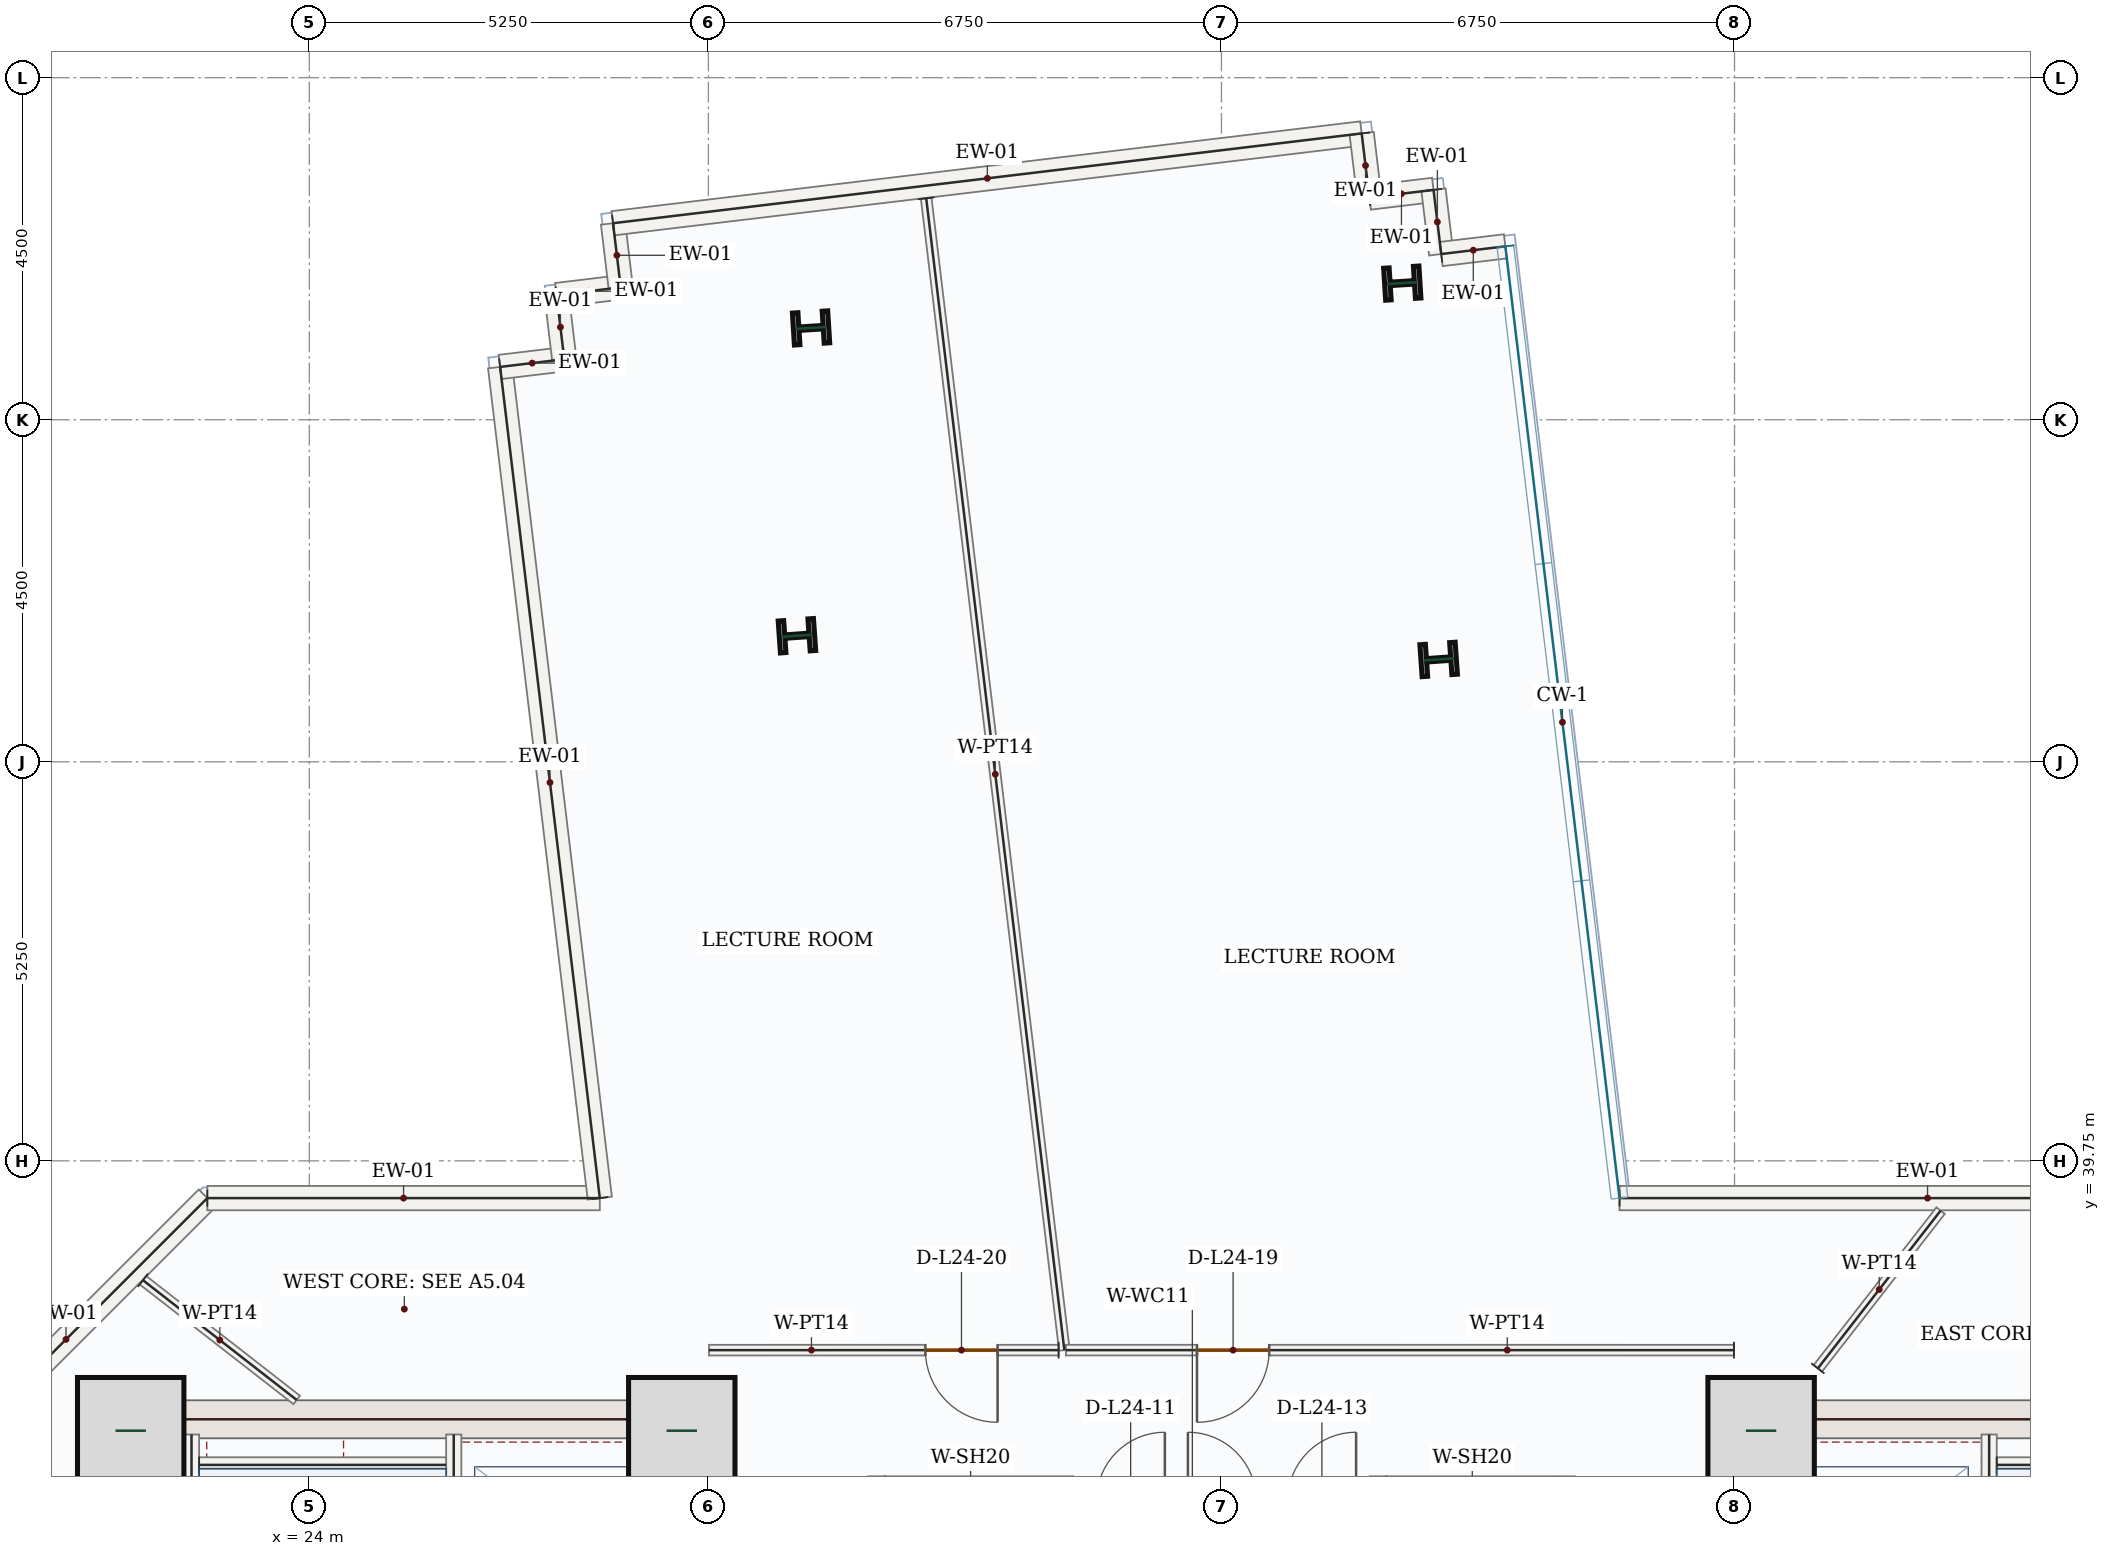
"""IFC4 building model, lengths in metres.
Left out: names, types, materials, properties, quantities, classifications, styles, units other than length and angle.
Written with IfcOpenShell. Run it as: python <this file> out.ifc"""

import sys

from ifc_helpers import new_model, si_unit, direction, frame, frame_2d, origin, origin_2d, place, context, subcontext, project, spatial, rectangle, i_section, extrude, source, transform, mapped, element, fill, save


model = new_model("IFC4")
c1 = context("Model", 3, precision=1e-05, world=origin(), true_north=direction((0.0, 1.0)))
c2 = subcontext(c1, "Body", "Model", "MODEL_VIEW")
j1 = project(units=[si_unit("LENGTHUNIT", "METRE"), si_unit("PLANEANGLEUNIT", "RADIAN")], contexts=[c1])
p1 = place(None, origin())
s1 = spatial("IfcSite", under=j1, at=p1, CompositionType="ELEMENT")
p2 = place(p1, origin())
s2 = spatial("IfcBuilding", under=s1, at=p2, CompositionType="ELEMENT")
p3 = place(p2, frame((0.0, 0.0, 108.9)))
s3 = spatial("IfcBuildingStorey", under=s2, at=p3, CompositionType="ELEMENT", Elevation=108.9)
m1 = source(origin(), c2, "Body", "SweptSolid", [
    extrude(rectangle(XDim=8.55, YDim=0.5, at=frame_2d((4.275, 0.0))), origin(), (0.0, 0.0, 1.0), 3.95),
])
p4 = place(p3, frame((21.5, 28.05, 0.0), z_axis=(0.0, 0.0, 1.0), x_axis=(0.0, 1.0, 0.0)))
e1 = element("IfcWall", 1, at=p4, inside=s3, PredefinedType="SHEAR", context=c2, shape_type="MappedRepresentation", body=[
    mapped(m1, transform((0.0, 0.0, 0.0), x_axis=(1.0, 0.0, 0.0), y_axis=(0.0, 1.0, 0.0), z_axis=(0.0, 0.0, 1.0), scale=1.0)),
])
p5 = place(p3, frame((29.0, 28.05, 0.0), z_axis=(0.0, 0.0, 1.0), x_axis=(0.0, 1.0, 0.0)))
e2 = element("IfcWall", 2, at=p5, inside=s3, PredefinedType="SHEAR", context=c2, shape_type="SweptSolid", body=[
    extrude(rectangle(XDim=8.55, YDim=0.5, at=frame_2d((4.275, 0.0))), origin(), (0.0, 0.0, 1.0), 3.95),
])
p6 = place(p5, frame((1.5, 0.0, 0.0)))
e3 = element("IfcOpeningElement", 3, at=p6, cuts=e2, PredefinedType="OPENING", context=c2, shape_type="SweptSolid", body=[
    extrude(rectangle(XDim=1.1, YDim=2.2, at=frame_2d((0.55, 1.1))), frame((0.0, 0.26, 0.0), z_axis=(0.0, -1.0, 0.0), x_axis=(1.0, 0.0, 0.0)), (0.0, 0.0, 1.0), 0.52),
])
m2 = source(origin(), c2, "Body", "SweptSolid", [
    extrude(rectangle(XDim=7.0, YDim=0.5, at=frame_2d((3.5, 0.0))), origin(), (0.0, 0.0, 1.0), 3.95),
])
p7 = place(p3, frame((21.75, 36.35, 0.0), z_axis=(0.0, 0.0, 1.0), x_axis=(1.0, 0.0, 0.0)))
e4 = element("IfcWall", 4, at=p7, inside=s3, PredefinedType="SHEAR", context=c2, shape_type="MappedRepresentation", body=[
    mapped(m2, transform((0.0, 0.0, 0.0), x_axis=(1.0, 0.0, 0.0), y_axis=(0.0, 1.0, 0.0), z_axis=(0.0, 0.0, 1.0), scale=1.0)),
])
p8 = place(p3, frame((43.0, 28.05, 0.0), z_axis=(0.0, 0.0, 1.0), x_axis=(0.0, 1.0, 0.0)))
e5 = element("IfcWall", 5, at=p8, inside=s3, PredefinedType="SHEAR", context=c2, shape_type="SweptSolid", body=[
    extrude(rectangle(XDim=8.55, YDim=0.5, at=frame_2d((4.275, 0.0))), origin(), (0.0, 0.0, 1.0), 3.95),
])
p9 = place(p8, frame((1.5, 0.0, 0.0)))
e6 = element("IfcOpeningElement", 6, at=p9, cuts=e5, PredefinedType="OPENING", context=c2, shape_type="SweptSolid", body=[
    extrude(rectangle(XDim=1.1, YDim=2.2, at=frame_2d((0.55, 1.1))), frame((0.0, 0.26, 0.0), z_axis=(0.0, -1.0, 0.0), x_axis=(1.0, 0.0, 0.0)), (0.0, 0.0, 1.0), 0.52),
])
p10 = place(p3, frame((43.25, 36.35, 0.0), z_axis=(0.0, 0.0, 1.0), x_axis=(1.0, 0.0, 0.0)))
e7 = element("IfcWall", 7, at=p10, inside=s3, PredefinedType="SHEAR", context=c2, shape_type="MappedRepresentation", body=[
    mapped(m2, transform((0.0, 0.0, 0.0), x_axis=(1.0, 0.0, 0.0), y_axis=(0.0, 1.0, 0.0), z_axis=(0.0, 0.0, 1.0), scale=1.0)),
])
m3 = source(origin(), c2, "Body", "SweptSolid", [
    extrude(rectangle(XDim=1.4, YDim=1.4, at=origin_2d()), origin(), (0.0, 0.0, 1.0), 4.2),
])
for number, where, z_axis, x_axis in (
    (8, (21.65, 36.2, 0.0), (0.0, 0.0, 1.0), (1.0, 0.0, 0.0)),
    (9, (28.9, 36.2, 0.0), (0.0, 0.0, 1.0), (1.0, 0.0, 0.0)),
    (10, (43.1, 36.2, 0.0), (0.0, 0.0, 1.0), (1.0, 0.0, 0.0)),
):
    element("IfcColumn", number, at=place(p3, frame(where, z_axis=z_axis, x_axis=x_axis)), inside=s3, PredefinedType="COLUMN", context=c2, shape_type="MappedRepresentation", body=[
        mapped(m3, transform((0.0, 0.0, 0.0), x_axis=(1.0, 0.0, 0.0), y_axis=(0.0, 1.0, 0.0), z_axis=(0.0, 0.0, 1.0), scale=1.0)),
    ])
m4 = source(origin(), c2, "Body", "SweptSolid", [
    extrude(i_section(OverallWidth=0.421, OverallDepth=0.465, WebThickness=0.045, FlangeThickness=0.073, FilletRadius=0.018, at=origin_2d()), origin(), (0.0, 0.0, 1.0), 4.2),
])
for number, where, z_axis, x_axis in (
    (11, (38.857, 46.346, 0.0), (0.0, 0.0, 1.0), (-0.07, 0.998, 0.0)),
    (12, (30.415, 46.658, 0.0), (0.0, 0.0, 1.0), (-0.07, 0.998, 0.0)),
    (13, (38.379, 51.297, 0.0), (0.0, 0.0, 1.0), (-0.063, 0.998, 0.0)),
    (14, (30.601, 50.708, 0.0), (0.0, 0.0, 1.0), (-0.063, 0.998, 0.0)),
):
    element("IfcColumn", number, at=place(p3, frame(where, z_axis=z_axis, x_axis=x_axis)), inside=s3, PredefinedType="COLUMN", context=c2, shape_type="MappedRepresentation", body=[
        mapped(m4, transform((0.0, 0.0, 0.0), x_axis=(1.0, 0.0, 0.0), y_axis=(0.0, 1.0, 0.0), z_axis=(0.0, 0.0, 1.0), scale=1.0)),
    ])
m5 = source(origin(), c2, "Body", "SweptSolid", [
    extrude(rectangle(XDim=5.258, YDim=0.32, at=frame_2d((2.629, 0.0))), origin(), (0.0, 0.0, 1.0), 3.95),
])
p11 = place(p3, frame((18.94, 35.542, 0.0), z_axis=(0.0, 0.0, 1.0), x_axis=(0.707106781187, 0.707106781187, 0.0)))
e15 = element("IfcWall", 15, at=p11, inside=s3, PredefinedType="SOLIDWALL", context=c2, shape_type="MappedRepresentation", body=[
    mapped(m5, transform((0.0, 0.0, 0.0), x_axis=(1.0, 0.0, 0.0), y_axis=(0.0, 1.0, 0.0), z_axis=(0.0, 0.0, 1.0), scale=1.0)),
])
m6 = source(origin(), c2, "Body", "SweptSolid", [
    extrude(rectangle(XDim=5.164, YDim=0.32, at=frame_2d((2.582, 0.0))), origin(), (0.0, 0.0, 1.0), 3.95),
])
p12 = place(p3, frame((22.658, 39.26, 0.0), z_axis=(0.0, 0.0, 1.0), x_axis=(1.0, 0.0, 0.0)))
e16 = element("IfcWall", 16, at=p12, inside=s3, PredefinedType="SOLIDWALL", context=c2, shape_type="MappedRepresentation", body=[
    mapped(m6, transform((0.0, 0.0, 0.0), x_axis=(1.0, 0.0, 0.0), y_axis=(0.0, 1.0, 0.0), z_axis=(0.0, 0.0, 1.0), scale=1.0)),
])
m7 = source(origin(), c2, "Body", "SweptSolid", [
    extrude(rectangle(XDim=11.013, YDim=0.32, at=frame_2d((5.507, 0.0))), origin(), (0.0, 0.0, 1.0), 3.95),
])
p13 = place(p3, frame((27.822, 39.26, 0.0), z_axis=(0.0, 0.0, 1.0), x_axis=(-0.119086653457, 0.992883864794, 0.0)))
e17 = element("IfcWall", 17, at=p13, inside=s3, PredefinedType="SOLIDWALL", context=c2, shape_type="MappedRepresentation", body=[
    mapped(m7, transform((0.0, 0.0, 0.0), x_axis=(1.0, 0.0, 0.0), y_axis=(0.0, 1.0, 0.0), z_axis=(0.0, 0.0, 1.0), scale=1.0)),
])
m8 = source(origin(), c2, "Body", "SweptSolid", [
    extrude(rectangle(XDim=0.85, YDim=0.32, at=frame_2d((0.425, 0.0))), origin(), (0.0, 0.0, 1.0), 3.95),
])
for number, where, z_axis, x_axis in (
    (18, (26.51, 50.195, 0.0), (0.0, 0.0, 1.0), (0.993, 0.119, 0.0)),
    (19, (27.354, 50.296, 0.0), (0.0, 0.0, 1.0), (-0.119, 0.993, 0.0)),
    (20, (27.253, 51.14, 0.0), (0.0, 0.0, 1.0), (0.993, 0.119, 0.0)),
    (21, (28.097, 51.241, 0.0), (0.0, 0.0, 1.0), (-0.119, 0.993, 0.0)),
):
    element("IfcWall", number, at=place(p3, frame(where, z_axis=z_axis, x_axis=x_axis)), inside=s3, PredefinedType="SOLIDWALL", context=c2, shape_type="MappedRepresentation", body=[
        mapped(m8, transform((0.0, 0.0, 0.0), x_axis=(1.0, 0.0, 0.0), y_axis=(0.0, 1.0, 0.0), z_axis=(0.0, 0.0, 1.0), scale=1.0)),
    ])
m9 = source(origin(), c2, "Body", "SweptSolid", [
    extrude(rectangle(XDim=9.92, YDim=0.32, at=frame_2d((4.96, 0.0))), origin(), (0.0, 0.0, 1.0), 3.95),
])
p14 = place(p3, frame((27.996, 52.085, 0.0), z_axis=(0.0, 0.0, 1.0), x_axis=(0.992883125729, 0.119092815244, 0.0)))
e22 = element("IfcWall", 22, at=p14, inside=s3, PredefinedType="SOLIDWALL", context=c2, shape_type="MappedRepresentation", body=[
    mapped(m9, transform((0.0, 0.0, 0.0), x_axis=(1.0, 0.0, 0.0), y_axis=(0.0, 1.0, 0.0), z_axis=(0.0, 0.0, 1.0), scale=1.0)),
])
for number, where, z_axis, x_axis in (
    (23, (37.845, 53.267, 0.0), (0.0, 0.0, 1.0), (0.119, -0.993, 0.0)),
    (24, (37.946, 52.423, 0.0), (0.0, 0.0, 1.0), (0.993, 0.119, 0.0)),
    (25, (38.79, 52.524, 0.0), (0.0, 0.0, 1.0), (0.119, -0.993, 0.0)),
):
    element("IfcWall", number, at=place(p3, frame(where, z_axis=z_axis, x_axis=x_axis)), inside=s3, PredefinedType="SOLIDWALL", context=c2, shape_type="MappedRepresentation", body=[
        mapped(m8, transform((0.0, 0.0, 0.0), x_axis=(1.0, 0.0, 0.0), y_axis=(0.0, 1.0, 0.0), z_axis=(0.0, 0.0, 1.0), scale=1.0)),
    ])
m10 = source(origin(), c2, "Body", "SweptSolid", [
    extrude(rectangle(XDim=0.85, YDim=0.32, at=frame_2d((0.425, 0.0))), origin(), (0.0, 0.0, 1.0), 3.95),
])
p15 = place(p3, frame((38.891, 51.68, 0.0), z_axis=(0.0, 0.0, 1.0), x_axis=(0.992867319472, 0.119224518976, 0.0)))
e26 = element("IfcWall", 26, at=p15, inside=s3, PredefinedType="SOLIDWALL", context=c2, shape_type="MappedRepresentation", body=[
    mapped(m10, transform((0.0, 0.0, 0.0), x_axis=(1.0, 0.0, 0.0), y_axis=(0.0, 1.0, 0.0), z_axis=(0.0, 0.0, 1.0), scale=1.0)),
])
m11 = source(origin(), c2, "Body", "SweptSolid", [
    extrude(rectangle(XDim=8.105, YDim=0.32, at=frame_2d((4.052, 0.0))), origin(), (0.0, 0.0, 1.0), 3.95),
])
p16 = place(p3, frame((41.237, 39.26, 0.0), z_axis=(0.0, 0.0, 1.0), x_axis=(1.0, 0.0, 0.0)))
e27 = element("IfcWall", 27, at=p16, inside=s3, PredefinedType="SOLIDWALL", context=c2, shape_type="MappedRepresentation", body=[
    mapped(m11, transform((0.0, 0.0, 0.0), x_axis=(1.0, 0.0, 0.0), y_axis=(0.0, 1.0, 0.0), z_axis=(0.0, 0.0, 1.0), scale=1.0)),
])
m12 = source(origin(), c2, "Body", "SweptSolid", [
    extrude(rectangle(XDim=7.87, YDim=0.2, at=frame_2d((3.935, 0.0))), origin(), (0.0, 0.0, 1.0), 3.95),
])
p17 = place(p3, frame((22.45, 28.28, 0.0), z_axis=(0.0, 0.0, 1.0), x_axis=(0.0, 1.0, 0.0)))
e28 = element("IfcWall", 28, at=p17, inside=s3, PredefinedType="SOLIDWALL", context=c2, shape_type="MappedRepresentation", body=[
    mapped(m12, transform((0.0, 0.0, 0.0), x_axis=(1.0, 0.0, 0.0), y_axis=(0.0, 1.0, 0.0), z_axis=(0.0, 0.0, 1.0), scale=1.0)),
])
p18 = place(p3, frame((25.9, 28.15, 0.0), z_axis=(0.0, 0.0, 1.0), x_axis=(0.0, 1.0, 0.0)))
e29 = element("IfcWall", 29, at=p18, inside=s3, PredefinedType="SOLIDWALL", context=c2, shape_type="SweptSolid", body=[
    extrude(rectangle(XDim=8.0, YDim=0.2, at=frame_2d((4.0, 0.0))), origin(), (0.0, 0.0, 1.0), 3.95),
])
p19 = place(p18, frame((0.4, 0.0, 0.0)))
e30 = element("IfcOpeningElement", 30, at=p19, cuts=e29, PredefinedType="OPENING", context=c2, shape_type="SweptSolid", body=[
    extrude(rectangle(XDim=1.05, YDim=2.15, at=frame_2d((0.525, 1.075))), frame((0.0, 0.11, 0.0), z_axis=(0.0, -1.0, 0.0), x_axis=(1.0, 0.0, 0.0)), (0.0, 0.0, 1.0), 0.22),
])
p20 = place(p3, frame((46.1, 28.15, 0.0), z_axis=(0.0, 0.0, 1.0), x_axis=(0.0, 1.0, 0.0)))
e31 = element("IfcWall", 31, at=p20, inside=s3, PredefinedType="SOLIDWALL", context=c2, shape_type="SweptSolid", body=[
    extrude(rectangle(XDim=8.0, YDim=0.2, at=frame_2d((4.0, 0.0))), origin(), (0.0, 0.0, 1.0), 3.95),
])
p21 = place(p20, frame((0.4, 0.0, 0.0)))
e32 = element("IfcOpeningElement", 32, at=p21, cuts=e31, PredefinedType="OPENING", context=c2, shape_type="SweptSolid", body=[
    extrude(rectangle(XDim=1.05, YDim=2.15, at=frame_2d((0.525, 1.075))), frame((0.0, 0.11, 0.0), z_axis=(0.0, -1.0, 0.0), x_axis=(1.0, 0.0, 0.0)), (0.0, 0.0, 1.0), 0.22),
])
m13 = source(origin(), c2, "Body", "SweptSolid", [
    extrude(rectangle(XDim=3.25, YDim=0.2, at=frame_2d((1.625, 0.0))), origin(), (0.0, 0.0, 1.0), 3.95),
])
for number, where, z_axis, x_axis in (
    (33, (22.55, 35.75, 0.0), (0.0, 0.0, 1.0), (1.0, 0.0, 0.0)),
    (34, (46.2, 35.75, 0.0), (0.0, 0.0, 1.0), (1.0, 0.0, 0.0)),
):
    element("IfcWall", number, at=place(p3, frame(where, z_axis=z_axis, x_axis=x_axis)), inside=s3, PredefinedType="SOLIDWALL", context=c2, shape_type="MappedRepresentation", body=[
        mapped(m13, transform((0.0, 0.0, 0.0), x_axis=(1.0, 0.0, 0.0), y_axis=(0.0, 1.0, 0.0), z_axis=(0.0, 0.0, 1.0), scale=1.0)),
    ])
m14 = source(origin(), c2, "Body", "SweptSolid", [
    extrude(rectangle(XDim=2.4, YDim=0.2, at=frame_2d((1.2, 0.0))), origin(), (0.0, 0.0, 1.0), 3.95),
])
for number, where, z_axis, x_axis in (
    (35, (31.45, 33.2, 0.0), (0.0, 0.0, 1.0), (0.0, 1.0, 0.0)),
    (36, (33.95, 33.2, 0.0), (0.0, 0.0, 1.0), (0.0, 1.0, 0.0)),
    (37, (38.05, 33.2, 0.0), (0.0, 0.0, 1.0), (0.0, 1.0, 0.0)),
    (38, (40.55, 33.2, 0.0), (0.0, 0.0, 1.0), (0.0, 1.0, 0.0)),
):
    element("IfcWall", number, at=place(p3, frame(where, z_axis=z_axis, x_axis=x_axis)), inside=s3, PredefinedType="SOLIDWALL", context=c2, shape_type="MappedRepresentation", body=[
        mapped(m14, transform((0.0, 0.0, 0.0), x_axis=(1.0, 0.0, 0.0), y_axis=(0.0, 1.0, 0.0), z_axis=(0.0, 0.0, 1.0), scale=1.0)),
    ])
m15 = source(origin(), c2, "Body", "SweptSolid", [
    extrude(rectangle(XDim=2.563, YDim=0.14, at=frame_2d((1.282, 0.0))), origin(), (0.0, 0.0, 1.0), 3.95),
])
p22 = place(p3, frame((21.811, 38.18, 0.0), z_axis=(0.0, 0.0, 1.0), x_axis=(0.789034129839, -0.614349364734, 0.0)))
e39 = element("IfcWall", 39, at=p22, inside=s3, PredefinedType="PARTITIONING", context=c2, shape_type="MappedRepresentation", body=[
    mapped(m15, transform((0.0, 0.0, 0.0), x_axis=(1.0, 0.0, 0.0), y_axis=(0.0, 1.0, 0.0), z_axis=(0.0, 0.0, 1.0), scale=1.0)),
])
m16 = source(origin(), c2, "Body", "SweptSolid", [
    extrude(rectangle(XDim=2.629, YDim=0.14, at=frame_2d((1.315, 0.0))), origin(), (0.0, 0.0, 1.0), 3.95),
])
p23 = place(p3, frame((43.846, 37.02, 0.0), z_axis=(0.0, 0.0, 1.0), x_axis=(0.614210560268, 0.789142184689, 0.0)))
e40 = element("IfcWall", 40, at=p23, inside=s3, PredefinedType="PARTITIONING", context=c2, shape_type="MappedRepresentation", body=[
    mapped(m16, transform((0.0, 0.0, 0.0), x_axis=(1.0, 0.0, 0.0), y_axis=(0.0, 1.0, 0.0), z_axis=(0.0, 0.0, 1.0), scale=1.0)),
])
m17 = source(origin(), c2, "Body", "SweptSolid", [
    extrude(rectangle(XDim=15.262, YDim=0.14, at=frame_2d((7.631, 0.0))), origin(), (0.0, 0.0, 1.0), 3.95),
])
p24 = place(p3, frame((32.116, 52.413, 0.0), z_axis=(0.0, 0.0, 1.0), x_axis=(0.119095388495, -0.992882817073, 0.0)))
e41 = element("IfcWall", 41, at=p24, inside=s3, PredefinedType="PARTITIONING", context=c2, shape_type="MappedRepresentation", body=[
    mapped(m17, transform((0.0, 0.0, 0.0), x_axis=(1.0, 0.0, 0.0), y_axis=(0.0, 1.0, 0.0), z_axis=(0.0, 0.0, 1.0), scale=1.0)),
])
p25 = place(p3, frame((33.858, 37.26, 0.0), z_axis=(0.0, 0.0, 1.0), x_axis=(-0.999999998592, -5.3070106e-05, 0.0)))
e42 = element("IfcWall", 42, at=p25, inside=s3, PredefinedType="PARTITIONING", context=c2, shape_type="SweptSolid", body=[
    extrude(rectangle(XDim=4.6, YDim=0.14, at=frame_2d((2.3, 0.0))), origin(), (0.0, 0.0, 1.0), 3.95),
])
p26 = place(p25, frame((0.803, 0.0, 0.0)))
e43 = element("IfcOpeningElement", 43, at=p26, cuts=e42, PredefinedType="OPENING", context=c2, shape_type="SweptSolid", body=[
    extrude(rectangle(XDim=0.95, YDim=2.15, at=frame_2d((0.475, 1.075))), frame((0.0, 0.08, 0.0), z_axis=(0.0, -1.0, 0.0), x_axis=(1.0, 0.0, 0.0)), (0.0, 0.0, 1.0), 0.16),
])
p27 = place(p3, frame((42.742, 37.26, 0.0), z_axis=(0.0, 0.0, 1.0), x_axis=(-0.999999999614, 2.7778549e-05, 0.0)))
e44 = element("IfcWall", 44, at=p27, inside=s3, PredefinedType="PARTITIONING", context=c2, shape_type="SweptSolid", body=[
    extrude(rectangle(XDim=8.789, YDim=0.14, at=frame_2d((4.395, 0.0))), origin(), (0.0, 0.0, 1.0), 3.95),
])
p28 = place(p27, frame((6.114, 0.0, 0.0)))
e45 = element("IfcOpeningElement", 45, at=p28, cuts=e44, PredefinedType="OPENING", context=c2, shape_type="SweptSolid", body=[
    extrude(rectangle(XDim=0.95, YDim=2.15, at=frame_2d((0.475, 1.075))), frame((0.0, 0.08, 0.0), z_axis=(0.0, -1.0, 0.0), x_axis=(1.0, 0.0, 0.0)), (0.0, 0.0, 1.0), 0.16),
])
m18 = source(origin(), c2, "Body", "SweptSolid", [
    extrude(rectangle(XDim=0.95, YDim=2.15, at=frame_2d((0.475, 1.075))), frame((0.0, 0.025, 0.0), z_axis=(0.0, -1.0, 0.0), x_axis=(1.0, 0.0, 0.0)), (0.0, 0.0, 1.0), 0.05),
])
p29 = place(p28, origin())
e46 = element("IfcDoor", 46, at=p29, inside=s3, OperationType="SINGLE_SWING_RIGHT", PredefinedType="DOOR", context=c2, shape_type="MappedRepresentation", body=[
    mapped(m18, transform((0.0, 0.0, 0.0), x_axis=(1.0, 0.0, 0.0), y_axis=(0.0, 1.0, 0.0), z_axis=(0.0, 0.0, 1.0), scale=1.0)),
])
fill(e45, e46)
p30 = place(p26, origin())
e47 = element("IfcDoor", 47, at=p30, inside=s3, OperationType="SINGLE_SWING_LEFT", PredefinedType="DOOR", context=c2, shape_type="MappedRepresentation", body=[
    mapped(m18, transform((0.0, 0.0, 0.0), x_axis=(1.0, 0.0, 0.0), y_axis=(0.0, 1.0, 0.0), z_axis=(0.0, 0.0, 1.0), scale=1.0)),
])
fill(e43, e47)
save(model, sys.argv[1])
